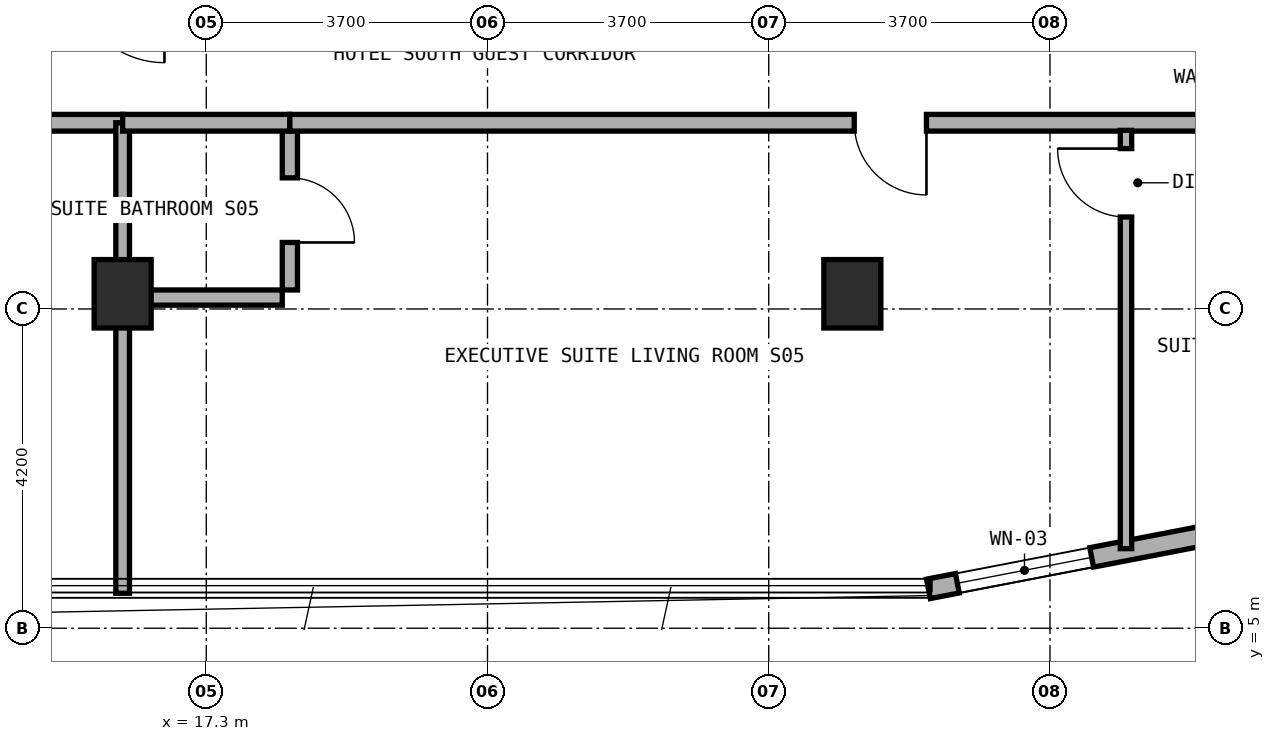
"""IFC4 building model, lengths in metres.
Left out: names, types, materials, properties, quantities, classifications, styles, units other than length and angle.
Written with IfcOpenShell. Run it as: python <this file> out.ifc"""

import sys

from ifc_helpers import new_model, si_unit, direction, frame, frame_2d, origin, origin_2d, place, context, subcontext, project, spatial, rectangle, extrude, element, fill, save


model = new_model("IFC4")
c1 = context("Model", 3, precision=1e-05, world=origin(), true_north=direction((0.0, 1.0)))
c2 = subcontext(c1, "Body", "Model", "MODEL_VIEW")
j1 = project(units=[si_unit("LENGTHUNIT", "METRE"), si_unit("PLANEANGLEUNIT", "RADIAN")], contexts=[c1])
p1 = place(None, origin())
s1 = spatial("IfcSite", under=j1, at=p1, CompositionType="ELEMENT")
p2 = place(p1, origin())
s2 = spatial("IfcBuilding", under=s1, at=p2, CompositionType="ELEMENT")
p3 = place(p2, frame((0.0, 0.0, 191.9)))
s3 = spatial("IfcBuildingStorey", under=s2, at=p3, CompositionType="ELEMENT", Elevation=191.9)
for number, where, z_axis, x_axis in (
    (1, (16.2, 9.4, 0.0), (0.0, 0.0, 1.0), (1.0, 0.0, 0.0)),
    (2, (25.8, 9.4, 0.0), (0.0, 0.0, 1.0), (1.0, 0.0, 0.0)),
):
    element("IfcColumn", number, at=place(p3, frame(where, z_axis=z_axis, x_axis=x_axis)), inside=s3, PredefinedType="COLUMN", context=c2, shape_type="SweptSolid", body=[
        extrude(rectangle(XDim=0.75, YDim=0.9, at=origin_2d()), origin(), (0.0, 0.0, 1.0), 3.6),
    ])
p4 = place(p3, frame((26.801, 5.518, 0.0), z_axis=(0.0, 0.0, 1.0), x_axis=(0.98192801022, 0.189254809039, 0.0)))
e3 = element("IfcWall", 3, at=p4, inside=s3, PredefinedType="STANDARD", context=c2, shape_type="SweptSolid", body=[
    extrude(rectangle(XDim=9.046, YDim=0.26, at=frame_2d((4.523, 0.0))), origin(), (0.0, 0.0, 1.0), 3.32),
])
p5 = place(p4, frame((0.387, 0.0, 0.85)))
e4 = element("IfcOpeningElement", 4, at=p5, cuts=e3, PredefinedType="OPENING", context=c2, shape_type="SweptSolid", body=[
    extrude(rectangle(XDim=1.8, YDim=1.5, at=frame_2d((0.9, 0.75))), frame((0.0, 0.14, 0.0), z_axis=(0.0, -1.0, 0.0), x_axis=(1.0, 0.0, 0.0)), (0.0, 0.0, 1.0), 0.28),
])
p6 = place(p4, frame((4.065, 0.0, 0.85)))
e5 = element("IfcOpeningElement", 5, at=p6, cuts=e3, PredefinedType="OPENING", context=c2, shape_type="SweptSolid", body=[
    extrude(rectangle(XDim=2.1, YDim=1.5, at=frame_2d((1.05, 0.75))), frame((0.0, 0.14, 0.0), z_axis=(0.0, -1.0, 0.0), x_axis=(1.0, 0.0, 0.0)), (0.0, 0.0, 1.0), 0.28),
])
p7 = place(p3, frame((5.55, 11.65, 0.0), z_axis=(0.0, 0.0, 1.0), x_axis=(1.0, 0.0, 0.0)))
e6 = element("IfcWall", 6, at=p7, inside=s3, PredefinedType="SOLIDWALL", context=c2, shape_type="SweptSolid", body=[
    extrude(rectangle(XDim=10.65, YDim=0.22, at=frame_2d((5.325, 0.0))), origin(), (0.0, 0.0, 1.0), 2.995),
])
p8 = place(p7, frame((4.85, 0.0, 0.0)))
e7 = element("IfcOpeningElement", 7, at=p8, cuts=e6, PredefinedType="OPENING", context=c2, shape_type="SweptSolid", body=[
    extrude(rectangle(XDim=0.95, YDim=2.1, at=frame_2d((0.475, 1.05))), frame((0.0, 0.12, 0.0), z_axis=(0.0, -1.0, 0.0), x_axis=(1.0, 0.0, 0.0)), (0.0, 0.0, 1.0), 0.24),
])
p9 = place(p3, frame((16.2, 5.46, 0.0), z_axis=(0.0, 0.0, 1.0), x_axis=(0.0, 1.0, 0.0)))
e8 = element("IfcWall", 8, at=p9, inside=s3, PredefinedType="SOLIDWALL", context=c2, shape_type="SweptSolid", body=[
    extrude(rectangle(XDim=6.19, YDim=0.18, at=frame_2d((3.095, 0.0))), origin(), (0.0, 0.0, 1.0), 2.935),
])
p10 = place(p3, frame((18.4, 9.45, 0.0), z_axis=(0.0, 0.0, 1.0), x_axis=(0.0, 1.0, 0.0)))
e9 = element("IfcWall", 9, at=p10, inside=s3, PredefinedType="PLUMBINGWALL", context=c2, shape_type="SweptSolid", body=[
    extrude(rectangle(XDim=2.1, YDim=0.2, at=frame_2d((1.05, 0.0))), origin(), (0.0, 0.0, 1.0), 2.935),
])
p11 = place(p10, frame((0.625, 0.0, 0.0)))
e10 = element("IfcOpeningElement", 10, at=p11, cuts=e9, PredefinedType="OPENING", context=c2, shape_type="SweptSolid", body=[
    extrude(rectangle(XDim=0.85, YDim=2.1, at=frame_2d((0.425, 1.05))), frame((0.0, 0.11, 0.0), z_axis=(0.0, -1.0, 0.0), x_axis=(1.0, 0.0, 0.0)), (0.0, 0.0, 1.0), 0.22),
])
p12 = place(p3, frame((16.3, 9.35, 0.0), z_axis=(0.0, 0.0, 1.0), x_axis=(1.0, 0.0, 0.0)))
e11 = element("IfcWall", 11, at=p12, inside=s3, PredefinedType="PLUMBINGWALL", context=c2, shape_type="SweptSolid", body=[
    extrude(rectangle(XDim=2.0, YDim=0.2, at=frame_2d((1.0, 0.0))), origin(), (0.0, 0.0, 1.0), 2.935),
])
p13 = place(p3, frame((16.2, 11.65, 0.0), z_axis=(0.0, 0.0, 1.0), x_axis=(1.0, 0.0, 0.0)))
e12 = element("IfcWall", 12, at=p13, inside=s3, PredefinedType="SOLIDWALL", context=c2, shape_type="SweptSolid", body=[
    extrude(rectangle(XDim=2.2, YDim=0.22, at=frame_2d((1.1, 0.0))), origin(), (0.0, 0.0, 1.0), 2.995),
])
p14 = place(p3, frame((18.4, 11.65, 0.0), z_axis=(0.0, 0.0, 1.0), x_axis=(1.0, 0.0, 0.0)))
e13 = element("IfcWall", 13, at=p14, inside=s3, PredefinedType="SOLIDWALL", context=c2, shape_type="SweptSolid", body=[
    extrude(rectangle(XDim=15.8, YDim=0.22, at=frame_2d((7.9, 0.0))), origin(), (0.0, 0.0, 1.0), 2.995),
])
p15 = place(p14, frame((7.425, 0.0, 0.0)))
e14 = element("IfcOpeningElement", 14, at=p15, cuts=e13, PredefinedType="OPENING", context=c2, shape_type="SweptSolid", body=[
    extrude(rectangle(XDim=0.95, YDim=2.1, at=frame_2d((0.475, 1.05))), frame((0.0, 0.12, 0.0), z_axis=(0.0, -1.0, 0.0), x_axis=(1.0, 0.0, 0.0)), (0.0, 0.0, 1.0), 0.24),
])
p16 = place(p3, frame((29.4, 6.047, 0.0), z_axis=(0.0, 0.0, 1.0), x_axis=(0.0, 1.0, 0.0)))
e15 = element("IfcWall", 15, at=p16, inside=s3, PredefinedType="PARTITIONING", context=c2, shape_type="SweptSolid", body=[
    extrude(rectangle(XDim=5.503, YDim=0.15, at=frame_2d((2.751, 0.0))), origin(), (0.0, 0.0, 1.0), 2.935),
])
p17 = place(p16, frame((4.363, 0.0, 0.0)))
e16 = element("IfcOpeningElement", 16, at=p17, cuts=e15, PredefinedType="OPENING", context=c2, shape_type="SweptSolid", body=[
    extrude(rectangle(XDim=0.9, YDim=2.1, at=frame_2d((0.45, 1.05))), frame((0.0, 0.085, 0.0), z_axis=(0.0, -1.0, 0.0), x_axis=(1.0, 0.0, 0.0)), (0.0, 0.0, 1.0), 0.17),
])
p18 = place(p5, origin())
e17 = element("IfcWindow", 17, at=p18, inside=s3, PartitioningType="SINGLE_PANEL", PredefinedType="WINDOW", context=c2, shape_type="SweptSolid", body=[
    extrude(rectangle(XDim=1.8, YDim=1.5, at=frame_2d((0.9, 0.75))), frame((0.0, 0.03, 0.0), z_axis=(0.0, -1.0, 0.0), x_axis=(1.0, 0.0, 0.0)), (0.0, 0.0, 1.0), 0.06),
])
fill(e4, e17)
p19 = place(p11, frame((0.85, 0.0, 0.0), z_axis=(0.0, 0.0, 1.0), x_axis=(-1.0, 0.0, 0.0)))
e18 = element("IfcDoor", 18, at=p19, inside=s3, OperationType="SINGLE_SWING_RIGHT", PredefinedType="DOOR", context=c2, shape_type="SweptSolid", body=[
    extrude(rectangle(XDim=0.85, YDim=2.1, at=frame_2d((0.425, 1.05))), frame((0.0, 0.025, 0.0), z_axis=(0.0, -1.0, 0.0), x_axis=(1.0, 0.0, 0.0)), (0.0, 0.0, 1.0), 0.05),
])
fill(e10, e18)
p20 = place(p15, frame((0.95, 0.0, 0.0), z_axis=(0.0, 0.0, 1.0), x_axis=(-1.0, 0.0, 0.0)))
e19 = element("IfcDoor", 19, at=p20, inside=s3, OperationType="SINGLE_SWING_LEFT", PredefinedType="DOOR", context=c2, shape_type="SweptSolid", body=[
    extrude(rectangle(XDim=0.95, YDim=2.1, at=frame_2d((0.475, 1.05))), frame((0.0, 0.025, 0.0), z_axis=(0.0, -1.0, 0.0), x_axis=(1.0, 0.0, 0.0)), (0.0, 0.0, 1.0), 0.05),
])
fill(e14, e19)
p21 = place(p17, origin())
e20 = element("IfcDoor", 20, at=p21, inside=s3, OperationType="SINGLE_SWING_RIGHT", PredefinedType="DOOR", context=c2, shape_type="SweptSolid", body=[
    extrude(rectangle(XDim=0.9, YDim=2.1, at=frame_2d((0.45, 1.05))), frame((0.0, 0.025, 0.0), z_axis=(0.0, -1.0, 0.0), x_axis=(1.0, 0.0, 0.0)), (0.0, 0.0, 1.0), 0.05),
])
fill(e16, e20)
save(model, sys.argv[1])
